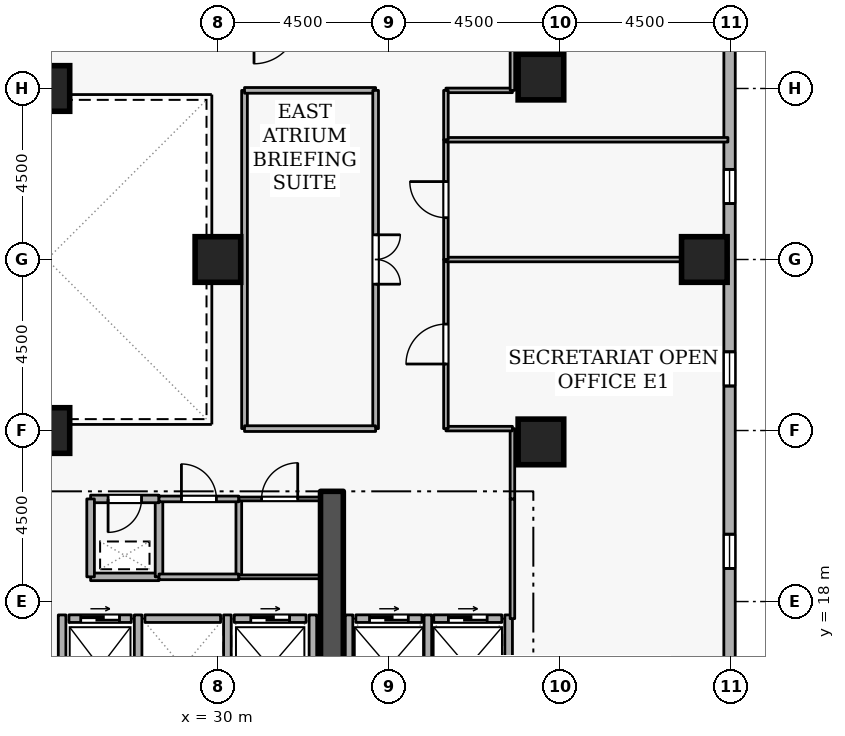
"""IFC4 building model, lengths in metres.
Left out: names, types, materials, properties, quantities, classifications, styles, units other than length and angle.
Written with IfcOpenShell. Run it as: python <this file> out.ifc"""

import sys

from ifc_helpers import new_model, si_unit, direction, frame, frame_2d, origin, origin_2d, place, context, subcontext, project, spatial, rectangle, extrude, element, fill, save


model = new_model("IFC4")
c1 = context("Model", 3, precision=1e-05, world=origin(), true_north=direction((0.0, 1.0)))
c2 = subcontext(c1, "Body", "Model", "MODEL_VIEW")
j1 = project(units=[si_unit("LENGTHUNIT", "METRE"), si_unit("PLANEANGLEUNIT", "RADIAN")], contexts=[c1])
p1 = place(None, origin())
s1 = spatial("IfcSite", under=j1, at=p1, CompositionType="ELEMENT")
p2 = place(p1, origin())
s2 = spatial("IfcBuilding", under=s1, at=p2, CompositionType="ELEMENT")
p3 = place(p2, frame((0.0, 0.0, 108.9)))
s3 = spatial("IfcBuildingStorey", under=s2, at=p3, CompositionType="ELEMENT", Elevation=108.9)
p4 = place(p3, frame((33.0, 15.2, 0.0), z_axis=(0.0, 0.0, 1.0), x_axis=(0.0, 1.0, 0.0)))
e1 = element("IfcWall", 1, at=p4, inside=s3, PredefinedType="SHEAR", context=c2, shape_type="SweptSolid", body=[
    extrude(rectangle(XDim=5.7, YDim=0.6, at=frame_2d((2.85, 0.0))), origin(), (0.0, 0.0, 1.0), 3.6),
])
for number, where, z_axis, x_axis in (
    (2, (42.8, 27.0, 0.0), (0.0, 0.0, 1.0), (1.0, 0.0, 0.0)),
    (3, (38.5, 22.2, 0.0), (0.0, 0.0, 1.0), (1.0, 0.0, 0.0)),
    (4, (38.5, 31.8, 0.0), (0.0, 0.0, 1.0), (1.0, 0.0, 0.0)),
    (5, (25.5, 22.5, 0.0), (0.0, 0.0, 1.0), (1.0, 0.0, 0.0)),
    (6, (25.5, 31.5, 0.0), (0.0, 0.0, 1.0), (1.0, 0.0, 0.0)),
    (7, (30.0, 27.0, 0.0), (0.0, 0.0, 1.0), (1.0, 0.0, 0.0)),
):
    element("IfcColumn", number, at=place(p3, frame(where, z_axis=z_axis, x_axis=x_axis)), inside=s3, PredefinedType="COLUMN", context=c2, shape_type="SweptSolid", body=[
        extrude(rectangle(XDim=1.2, YDim=1.2, at=origin_2d()), origin(), (0.0, 0.0, 1.0), 3.6),
    ])
p5 = place(p3, frame((43.463, 12.271, 0.0), z_axis=(0.0, 0.0, 1.0), x_axis=(5.4088042e-05, 0.999999998537, 0.0)))
e8 = element("IfcWall", 8, at=p5, inside=s3, PredefinedType="STANDARD", context=c2, shape_type="SweptSolid", body=[
    extrude(rectangle(XDim=36.11, YDim=0.3, at=frame_2d((18.055, 0.0))), origin(), (0.0, 0.0, 1.0), 2.7),
])
p6 = place(p5, frame((6.6, 0.0, 0.72)))
e9 = element("IfcOpeningElement", 9, at=p6, cuts=e8, PredefinedType="OPENING", context=c2, shape_type="SweptSolid", body=[
    extrude(rectangle(XDim=0.9, YDim=1.75, at=frame_2d((0.45, 0.875))), frame((0.0, 0.16, 0.0), z_axis=(0.0, -1.0, 0.0), x_axis=(1.0, 0.0, 0.0)), (0.0, 0.0, 1.0), 0.32),
])
p7 = place(p5, frame((11.4, 0.0, 0.72)))
e10 = element("IfcOpeningElement", 10, at=p7, cuts=e8, PredefinedType="OPENING", context=c2, shape_type="SweptSolid", body=[
    extrude(rectangle(XDim=0.9, YDim=1.75, at=frame_2d((0.45, 0.875))), frame((0.0, 0.16, 0.0), z_axis=(0.0, -1.0, 0.0), x_axis=(1.0, 0.0, 0.0)), (0.0, 0.0, 1.0), 0.32),
])
p8 = place(p5, frame((16.2, 0.0, 0.72)))
e11 = element("IfcOpeningElement", 11, at=p8, cuts=e8, PredefinedType="OPENING", context=c2, shape_type="SweptSolid", body=[
    extrude(rectangle(XDim=0.9, YDim=1.75, at=frame_2d((0.45, 0.875))), frame((0.0, 0.16, 0.0), z_axis=(0.0, -1.0, 0.0), x_axis=(1.0, 0.0, 0.0)), (0.0, 0.0, 1.0), 0.32),
])
p9 = place(p5, frame((21.0, 0.0, 0.72)))
e12 = element("IfcOpeningElement", 12, at=p9, cuts=e8, PredefinedType="OPENING", context=c2, shape_type="SweptSolid", body=[
    extrude(rectangle(XDim=0.9, YDim=1.75, at=frame_2d((0.45, 0.875))), frame((0.0, 0.16, 0.0), z_axis=(0.0, -1.0, 0.0), x_axis=(1.0, 0.0, 0.0)), (0.0, 0.0, 1.0), 0.32),
])
p10 = place(p5, frame((30.6, 0.0, 0.72)))
e13 = element("IfcOpeningElement", 13, at=p10, cuts=e8, PredefinedType="OPENING", context=c2, shape_type="SweptSolid", body=[
    extrude(rectangle(XDim=0.9, YDim=1.75, at=frame_2d((0.45, 0.875))), frame((0.0, 0.16, 0.0), z_axis=(0.0, -1.0, 0.0), x_axis=(1.0, 0.0, 0.0)), (0.0, 0.0, 1.0), 0.32),
])
p11 = place(p3, frame((26.08, 17.55, 0.0), z_axis=(0.0, 0.0, 1.0), x_axis=(1.0, 0.0, 0.0)))
e14 = element("IfcWall", 14, at=p11, inside=s3, PredefinedType="STANDARD", context=c2, shape_type="SweptSolid", body=[
    extrude(rectangle(XDim=1.64, YDim=0.2, at=frame_2d((0.82, 0.0))), origin(), (0.0, 0.0, 1.0), 3.34),
])
p12 = place(p11, frame((0.31, 0.0, 0.0)))
e15 = element("IfcOpeningElement", 15, at=p12, cuts=e14, PredefinedType="OPENING", context=c2, shape_type="SweptSolid", body=[
    extrude(rectangle(XDim=1.02, YDim=2.06, at=frame_2d((0.51, 1.03))), frame((0.0, 0.11, 0.0), z_axis=(0.0, -1.0, 0.0), x_axis=(1.0, 0.0, 0.0)), (0.0, 0.0, 1.0), 0.22),
])
p13 = place(p3, frame((28.08, 17.55, 0.0), z_axis=(0.0, 0.0, 1.0), x_axis=(1.0, 0.0, 0.0)))
e16 = element("IfcWall", 16, at=p13, inside=s3, PredefinedType="STANDARD", context=c2, shape_type="SweptSolid", body=[
    extrude(rectangle(XDim=1.99, YDim=0.2, at=frame_2d((0.995, 0.0))), origin(), (0.0, 0.0, 1.0), 3.34),
])
p14 = place(p3, frame((30.43, 17.55, 0.0), z_axis=(0.0, 0.0, 1.0), x_axis=(1.0, 0.0, 0.0)))
e17 = element("IfcWall", 17, at=p14, inside=s3, PredefinedType="STANDARD", context=c2, shape_type="SweptSolid", body=[
    extrude(rectangle(XDim=1.89, YDim=0.2, at=frame_2d((0.945, 0.0))), origin(), (0.0, 0.0, 1.0), 3.34),
])
p15 = place(p14, frame((0.435, 0.0, 0.0)))
e18 = element("IfcOpeningElement", 18, at=p15, cuts=e17, PredefinedType="OPENING", context=c2, shape_type="SweptSolid", body=[
    extrude(rectangle(XDim=1.02, YDim=2.06, at=frame_2d((0.51, 1.03))), frame((0.0, 0.11, 0.0), z_axis=(0.0, -1.0, 0.0), x_axis=(1.0, 0.0, 0.0)), (0.0, 0.0, 1.0), 0.22),
])
p16 = place(p3, frame((33.63, 17.55, 0.0), z_axis=(0.0, 0.0, 1.0), x_axis=(1.0, 0.0, 0.0)))
e19 = element("IfcWall", 19, at=p16, inside=s3, PredefinedType="STANDARD", context=c2, shape_type="SweptSolid", body=[
    extrude(rectangle(XDim=1.74, YDim=0.2, at=frame_2d((0.87, 0.0))), origin(), (0.0, 0.0, 1.0), 3.34),
])
p17 = place(p16, frame((0.36, 0.0, 0.0)))
e20 = element("IfcOpeningElement", 20, at=p17, cuts=e19, PredefinedType="OPENING", context=c2, shape_type="SweptSolid", body=[
    extrude(rectangle(XDim=1.02, YDim=2.06, at=frame_2d((0.51, 1.03))), frame((0.0, 0.11, 0.0), z_axis=(0.0, -1.0, 0.0), x_axis=(1.0, 0.0, 0.0)), (0.0, 0.0, 1.0), 0.22),
])
p18 = place(p3, frame((35.68, 17.55, 0.0), z_axis=(0.0, 0.0, 1.0), x_axis=(1.0, 0.0, 0.0)))
e21 = element("IfcWall", 21, at=p18, inside=s3, PredefinedType="STANDARD", context=c2, shape_type="SweptSolid", body=[
    extrude(rectangle(XDim=1.79, YDim=0.2, at=frame_2d((0.895, 0.0))), origin(), (0.0, 0.0, 1.0), 3.34),
])
p19 = place(p18, frame((0.385, 0.0, 0.0)))
e22 = element("IfcOpeningElement", 22, at=p19, cuts=e21, PredefinedType="OPENING", context=c2, shape_type="SweptSolid", body=[
    extrude(rectangle(XDim=1.02, YDim=2.06, at=frame_2d((0.51, 1.03))), frame((0.0, 0.11, 0.0), z_axis=(0.0, -1.0, 0.0), x_axis=(1.0, 0.0, 0.0)), (0.0, 0.0, 1.0), 0.22),
])
for number, where, z_axis, x_axis in (
    (23, (27.9, 15.212, 0.0), (0.0, 0.0, 1.0), (0.0, 1.0, 0.0)),
    (24, (25.9, 15.212, 0.0), (0.0, 0.0, 1.0), (0.0, 1.0, 0.0)),
    (25, (30.25, 15.212, 0.0), (0.0, 0.0, 1.0), (0.0, 1.0, 0.0)),
    (26, (32.5, 15.212, 0.0), (0.0, 0.0, 1.0), (0.0, 1.0, 0.0)),
):
    element("IfcWall", number, at=place(p3, frame(where, z_axis=z_axis, x_axis=x_axis)), inside=s3, PredefinedType="STANDARD", context=c2, shape_type="SweptSolid", body=[
        extrude(rectangle(XDim=2.436, YDim=0.2, at=frame_2d((1.218, 0.0))), origin(), (0.0, 0.0, 1.0), 3.34),
    ])
for number, where, z_axis, x_axis in (
    (27, (35.525, 15.012, 0.0), (0.0, 0.0, 1.0), (0.0, 1.0, 0.0)),
    (28, (33.45, 15.012, 0.0), (0.0, 0.0, 1.0), (0.0, 1.0, 0.0)),
    (29, (37.65, 15.012, 0.0), (0.0, 0.0, 1.0), (0.0, 1.0, 0.0)),
):
    element("IfcWall", number, at=place(p3, frame(where, z_axis=z_axis, x_axis=x_axis)), inside=s3, PredefinedType="STANDARD", context=c2, shape_type="SweptSolid", body=[
        extrude(rectangle(XDim=2.636, YDim=0.2, at=frame_2d((1.318, 0.0))), origin(), (0.0, 0.0, 1.0), 3.34),
    ])
p20 = place(p3, frame((26.65, 18.65, 0.0), z_axis=(0.0, 0.0, 1.0), x_axis=(1.0, 0.0, 0.0)))
e30 = element("IfcWall", 30, at=p20, inside=s3, PredefinedType="STANDARD", context=c2, shape_type="SweptSolid", body=[
    extrude(rectangle(XDim=1.8, YDim=0.2, at=frame_2d((0.9, 0.0))), origin(), (0.0, 0.0, 1.0), 3.34),
])
p21 = place(p3, frame((28.45, 18.65, 0.0), z_axis=(0.0, 0.0, 1.0), x_axis=(0.0, 1.0, 0.0)))
e31 = element("IfcWall", 31, at=p21, inside=s3, PredefinedType="STANDARD", context=c2, shape_type="SweptSolid", body=[
    extrude(rectangle(XDim=2.05, YDim=0.2, at=frame_2d((1.025, 0.0))), origin(), (0.0, 0.0, 1.0), 3.34),
])
p22 = place(p3, frame((28.45, 20.7, 0.0), z_axis=(0.0, 0.0, 1.0), x_axis=(-1.0, 0.0, 0.0)))
e32 = element("IfcWall", 32, at=p22, inside=s3, PredefinedType="STANDARD", context=c2, shape_type="SweptSolid", body=[
    extrude(rectangle(XDim=1.8, YDim=0.2, at=frame_2d((0.9, 0.0))), origin(), (0.0, 0.0, 1.0), 3.34),
])
p23 = place(p22, frame((0.46, 0.0, 0.0)))
e33 = element("IfcOpeningElement", 33, at=p23, cuts=e32, PredefinedType="OPENING", context=c2, shape_type="SweptSolid", body=[
    extrude(rectangle(XDim=0.88, YDim=2.04, at=frame_2d((0.44, 1.02))), frame((0.0, 0.11, 0.0), z_axis=(0.0, -1.0, 0.0), x_axis=(1.0, 0.0, 0.0)), (0.0, 0.0, 1.0), 0.22),
])
p24 = place(p3, frame((26.65, 20.7, 0.0), z_axis=(0.0, 0.0, 1.0), x_axis=(0.0, -1.0, 0.0)))
e34 = element("IfcWall", 34, at=p24, inside=s3, PredefinedType="STANDARD", context=c2, shape_type="SweptSolid", body=[
    extrude(rectangle(XDim=2.05, YDim=0.2, at=frame_2d((1.025, 0.0))), origin(), (0.0, 0.0, 1.0), 3.34),
])
p25 = place(p3, frame((30.55, 20.7, 0.0), z_axis=(0.0, 0.0, 1.0), x_axis=(0.0, -1.0, 0.0)))
e35 = element("IfcWall", 35, at=p25, inside=s3, PredefinedType="PARTITIONING", context=c2, shape_type="SweptSolid", body=[
    extrude(rectangle(XDim=2.05, YDim=0.15, at=frame_2d((1.025, 0.0))), origin(), (0.0, 0.0, 1.0), 3.34),
])
p26 = place(p3, frame((30.55, 18.65, 0.0), z_axis=(0.0, 0.0, 1.0), x_axis=(-1.0, 0.0, 0.0)))
e36 = element("IfcWall", 36, at=p26, inside=s3, PredefinedType="PARTITIONING", context=c2, shape_type="SweptSolid", body=[
    extrude(rectangle(XDim=2.1, YDim=0.15, at=frame_2d((1.05, 0.0))), origin(), (0.0, 0.0, 1.0), 3.34),
])
p27 = place(p3, frame((28.45, 20.7, 0.0), z_axis=(0.0, 0.0, 1.0), x_axis=(1.0, 0.0, 0.0)))
e37 = element("IfcWall", 37, at=p27, inside=s3, PredefinedType="PARTITIONING", context=c2, shape_type="SweptSolid", body=[
    extrude(rectangle(XDim=2.1, YDim=0.15, at=frame_2d((1.05, 0.0))), origin(), (0.0, 0.0, 1.0), 3.34),
])
p28 = place(p27, frame((0.59, 0.0, 0.0)))
e38 = element("IfcOpeningElement", 38, at=p28, cuts=e37, PredefinedType="OPENING", context=c2, shape_type="SweptSolid", body=[
    extrude(rectangle(XDim=0.92, YDim=2.08, at=frame_2d((0.46, 1.04))), frame((0.0, 0.085, 0.0), z_axis=(0.0, -1.0, 0.0), x_axis=(1.0, 0.0, 0.0)), (0.0, 0.0, 1.0), 0.17),
])
p29 = place(p3, frame((32.7, 18.65, 0.0), z_axis=(0.0, 0.0, 1.0), x_axis=(-1.0, 0.0, 0.0)))
e39 = element("IfcWall", 39, at=p29, inside=s3, PredefinedType="PARTITIONING", context=c2, shape_type="SweptSolid", body=[
    extrude(rectangle(XDim=2.15, YDim=0.1, at=frame_2d((1.075, 0.0))), origin(), (0.0, 0.0, 1.0), 3.34),
])
p30 = place(p3, frame((30.55, 20.7, 0.0), z_axis=(0.0, 0.0, 1.0), x_axis=(1.0, 0.0, 0.0)))
e40 = element("IfcWall", 40, at=p30, inside=s3, PredefinedType="PARTITIONING", context=c2, shape_type="SweptSolid", body=[
    extrude(rectangle(XDim=2.15, YDim=0.1, at=frame_2d((1.075, 0.0))), origin(), (0.0, 0.0, 1.0), 3.34),
])
p31 = place(p30, frame((0.6, 0.0, 0.0)))
e41 = element("IfcOpeningElement", 41, at=p31, cuts=e40, PredefinedType="OPENING", context=c2, shape_type="SweptSolid", body=[
    extrude(rectangle(XDim=0.95, YDim=2.1, at=frame_2d((0.475, 1.05))), frame((0.0, 0.06, 0.0), z_axis=(0.0, -1.0, 0.0), x_axis=(1.0, 0.0, 0.0)), (0.0, 0.0, 1.0), 0.12),
])
p32 = place(p3, frame((37.75, 17.55, 0.0), z_axis=(0.0, 0.0, 1.0), x_axis=(0.0, 1.0, 0.0)))
e42 = element("IfcWall", 42, at=p32, inside=s3, PredefinedType="PARTITIONING", context=c2, shape_type="SweptSolid", body=[
    extrude(rectangle(XDim=3.15, YDim=0.12, at=frame_2d((1.575, 0.0))), origin(), (0.0, 0.0, 1.0), 3.34),
])
p33 = place(p3, frame((37.75, 20.7, 0.0), z_axis=(0.0, 0.0, 1.0), x_axis=(0.0, 1.0, 0.0)))
e43 = element("IfcWall", 43, at=p33, inside=s3, PredefinedType="PARTITIONING", context=c2, shape_type="SweptSolid", body=[
    extrude(rectangle(XDim=1.85, YDim=0.12, at=frame_2d((0.925, 0.0))), origin(), (0.0, 0.0, 1.0), 3.34),
])
p34 = place(p3, frame((37.75, 22.55, 0.0), z_axis=(0.0, 0.0, 1.0), x_axis=(-1.0, 0.0, 0.0)))
e44 = element("IfcWall", 44, at=p34, inside=s3, PredefinedType="PARTITIONING", context=c2, shape_type="SweptSolid", body=[
    extrude(rectangle(XDim=1.75, YDim=0.12, at=frame_2d((0.875, 0.0))), origin(), (0.0, 0.0, 1.0), 3.34),
])
p35 = place(p3, frame((36.0, 22.55, 0.0), z_axis=(0.0, 0.0, 1.0), x_axis=(0.0, 1.0, 0.0)))
e45 = element("IfcWall", 45, at=p35, inside=s3, PredefinedType="PARTITIONING", context=c2, shape_type="SweptSolid", body=[
    extrude(rectangle(XDim=4.45, YDim=0.12, at=frame_2d((2.225, 0.0))), origin(), (0.0, 0.0, 1.0), 3.34),
])
p36 = place(p35, frame((1.7, 0.0, 0.0)))
e46 = element("IfcOpeningElement", 46, at=p36, cuts=e45, PredefinedType="OPENING", context=c2, shape_type="SweptSolid", body=[
    extrude(rectangle(XDim=1.05, YDim=2.1, at=frame_2d((0.525, 1.05))), frame((0.0, 0.07, 0.0), z_axis=(0.0, -1.0, 0.0), x_axis=(1.0, 0.0, 0.0)), (0.0, 0.0, 1.0), 0.14),
])
p37 = place(p3, frame((36.0, 27.0, 0.0), z_axis=(0.0, 0.0, 1.0), x_axis=(1.0, 0.0, 0.0)))
e47 = element("IfcWall", 47, at=p37, inside=s3, PredefinedType="PARTITIONING", context=c2, shape_type="SweptSolid", body=[
    extrude(rectangle(XDim=7.42, YDim=0.12, at=frame_2d((3.71, 0.0))), origin(), (0.0, 0.0, 1.0), 2.882),
])
p38 = place(p3, frame((36.0, 27.0, 0.0), z_axis=(0.0, 0.0, 1.0), x_axis=(0.0, 1.0, 0.0)))
e48 = element("IfcWall", 48, at=p38, inside=s3, PredefinedType="PARTITIONING", context=c2, shape_type="SweptSolid", body=[
    extrude(rectangle(XDim=3.15, YDim=0.12, at=frame_2d((1.575, 0.0))), origin(), (0.0, 0.0, 1.0), 3.34),
])
p39 = place(p38, frame((1.1, 0.0, 0.0)))
e49 = element("IfcOpeningElement", 49, at=p39, cuts=e48, PredefinedType="OPENING", context=c2, shape_type="SweptSolid", body=[
    extrude(rectangle(XDim=0.95, YDim=2.1, at=frame_2d((0.475, 1.05))), frame((0.0, 0.07, 0.0), z_axis=(0.0, -1.0, 0.0), x_axis=(1.0, 0.0, 0.0)), (0.0, 0.0, 1.0), 0.14),
])
p40 = place(p3, frame((36.0, 30.15, 0.0), z_axis=(0.0, 0.0, 1.0), x_axis=(1.0, 0.0, 0.0)))
e50 = element("IfcWall", 50, at=p40, inside=s3, PredefinedType="PARTITIONING", context=c2, shape_type="SweptSolid", body=[
    extrude(rectangle(XDim=7.42, YDim=0.12, at=frame_2d((3.71, 0.0))), origin(), (0.0, 0.0, 1.0), 3.34),
])
p41 = place(p3, frame((36.0, 31.45, 0.0), z_axis=(0.0, 0.0, 1.0), x_axis=(1.0, 0.0, 0.0)))
e51 = element("IfcWall", 51, at=p41, inside=s3, PredefinedType="PARTITIONING", context=c2, shape_type="SweptSolid", body=[
    extrude(rectangle(XDim=1.75, YDim=0.12, at=frame_2d((0.875, 0.0))), origin(), (0.0, 0.0, 1.0), 3.34),
])
p42 = place(p3, frame((37.75, 31.45, 0.0), z_axis=(0.0, 0.0, 1.0), x_axis=(0.0, 1.0, 0.0)))
e52 = element("IfcWall", 52, at=p42, inside=s3, PredefinedType="PARTITIONING", context=c2, shape_type="SweptSolid", body=[
    extrude(rectangle(XDim=1.85, YDim=0.12, at=frame_2d((0.925, 0.0))), origin(), (0.0, 0.0, 1.0), 3.34),
])
p43 = place(p3, frame((36.0, 30.15, 0.0), z_axis=(0.0, 0.0, 1.0), x_axis=(0.0, 1.0, 0.0)))
e53 = element("IfcWall", 53, at=p43, inside=s3, PredefinedType="PARTITIONING", context=c2, shape_type="SweptSolid", body=[
    extrude(rectangle(XDim=1.3, YDim=0.12, at=frame_2d((0.65, 0.0))), origin(), (0.0, 0.0, 1.0), 3.34),
])
p44 = place(p3, frame((30.7, 22.55, 0.0), z_axis=(0.0, 0.0, 1.0), x_axis=(0.0, 1.0, 0.0)))
e54 = element("IfcWall", 54, at=p44, inside=s3, PredefinedType="PARTITIONING", context=c2, shape_type="SweptSolid", body=[
    extrude(rectangle(XDim=8.9, YDim=0.15, at=frame_2d((4.45, 0.0))), origin(), (0.0, 0.0, 1.0), 3.34),
])
p45 = place(p3, frame((30.7, 31.45, 0.0), z_axis=(0.0, 0.0, 1.0), x_axis=(1.0, 0.0, 0.0)))
e55 = element("IfcWall", 55, at=p45, inside=s3, PredefinedType="PARTITIONING", context=c2, shape_type="SweptSolid", body=[
    extrude(rectangle(XDim=3.45, YDim=0.15, at=frame_2d((1.725, 0.0))), origin(), (0.0, 0.0, 1.0), 3.34),
])
p46 = place(p3, frame((34.15, 31.45, 0.0), z_axis=(0.0, 0.0, 1.0), x_axis=(0.0, -1.0, 0.0)))
e56 = element("IfcWall", 56, at=p46, inside=s3, PredefinedType="PARTITIONING", context=c2, shape_type="SweptSolid", body=[
    extrude(rectangle(XDim=8.9, YDim=0.15, at=frame_2d((4.45, 0.0))), origin(), (0.0, 0.0, 1.0), 3.34),
])
p47 = place(p46, frame((3.8, 0.0, 0.0)))
e57 = element("IfcOpeningElement", 57, at=p47, cuts=e56, PredefinedType="OPENING", context=c2, shape_type="SweptSolid", body=[
    extrude(rectangle(XDim=1.3, YDim=2.12, at=frame_2d((0.65, 1.06))), frame((0.0, 0.085, 0.0), z_axis=(0.0, -1.0, 0.0), x_axis=(1.0, 0.0, 0.0)), (0.0, 0.0, 1.0), 0.17),
])
p48 = place(p3, frame((34.15, 22.55, 0.0), z_axis=(0.0, 0.0, 1.0), x_axis=(-1.0, 0.0, 0.0)))
e58 = element("IfcWall", 58, at=p48, inside=s3, PredefinedType="PARTITIONING", context=c2, shape_type="SweptSolid", body=[
    extrude(rectangle(XDim=3.45, YDim=0.15, at=frame_2d((1.725, 0.0))), origin(), (0.0, 0.0, 1.0), 3.34),
])
p49 = place(p6, origin())
e59 = element("IfcWindow", 59, at=p49, inside=s3, PartitioningType="SINGLE_PANEL", PredefinedType="WINDOW", context=c2, shape_type="SweptSolid", body=[
    extrude(rectangle(XDim=0.9, YDim=1.75, at=frame_2d((0.45, 0.875))), frame((0.0, 0.03, 0.0), z_axis=(0.0, -1.0, 0.0), x_axis=(1.0, 0.0, 0.0)), (0.0, 0.0, 1.0), 0.06),
])
fill(e9, e59)
p50 = place(p7, origin())
e60 = element("IfcWindow", 60, at=p50, inside=s3, PartitioningType="SINGLE_PANEL", PredefinedType="WINDOW", context=c2, shape_type="SweptSolid", body=[
    extrude(rectangle(XDim=0.9, YDim=1.75, at=frame_2d((0.45, 0.875))), frame((0.0, 0.03, 0.0), z_axis=(0.0, -1.0, 0.0), x_axis=(1.0, 0.0, 0.0)), (0.0, 0.0, 1.0), 0.06),
])
fill(e10, e60)
p51 = place(p8, origin())
e61 = element("IfcWindow", 61, at=p51, inside=s3, PartitioningType="SINGLE_PANEL", PredefinedType="WINDOW", context=c2, shape_type="SweptSolid", body=[
    extrude(rectangle(XDim=0.9, YDim=1.75, at=frame_2d((0.45, 0.875))), frame((0.0, 0.03, 0.0), z_axis=(0.0, -1.0, 0.0), x_axis=(1.0, 0.0, 0.0)), (0.0, 0.0, 1.0), 0.06),
])
fill(e11, e61)
p52 = place(p12, origin())
e62 = element("IfcDoor", 62, at=p52, inside=s3, OperationType="SLIDING_TO_LEFT", PredefinedType="DOOR", context=c2, shape_type="SweptSolid", body=[
    extrude(rectangle(XDim=1.02, YDim=2.06, at=frame_2d((0.51, 1.03))), frame((0.0, 0.025, 0.0), z_axis=(0.0, -1.0, 0.0), x_axis=(1.0, 0.0, 0.0)), (0.0, 0.0, 1.0), 0.05),
])
fill(e15, e62)
p53 = place(p15, origin())
e63 = element("IfcDoor", 63, at=p53, inside=s3, OperationType="SLIDING_TO_LEFT", PredefinedType="DOOR", context=c2, shape_type="SweptSolid", body=[
    extrude(rectangle(XDim=1.02, YDim=2.06, at=frame_2d((0.51, 1.03))), frame((0.0, 0.025, 0.0), z_axis=(0.0, -1.0, 0.0), x_axis=(1.0, 0.0, 0.0)), (0.0, 0.0, 1.0), 0.05),
])
fill(e18, e63)
p54 = place(p17, origin())
e64 = element("IfcDoor", 64, at=p54, inside=s3, OperationType="SLIDING_TO_LEFT", PredefinedType="DOOR", context=c2, shape_type="SweptSolid", body=[
    extrude(rectangle(XDim=1.02, YDim=2.06, at=frame_2d((0.51, 1.03))), frame((0.0, 0.025, 0.0), z_axis=(0.0, -1.0, 0.0), x_axis=(1.0, 0.0, 0.0)), (0.0, 0.0, 1.0), 0.05),
])
fill(e20, e64)
p55 = place(p19, origin())
e65 = element("IfcDoor", 65, at=p55, inside=s3, OperationType="SLIDING_TO_LEFT", PredefinedType="DOOR", context=c2, shape_type="SweptSolid", body=[
    extrude(rectangle(XDim=1.02, YDim=2.06, at=frame_2d((0.51, 1.03))), frame((0.0, 0.025, 0.0), z_axis=(0.0, -1.0, 0.0), x_axis=(1.0, 0.0, 0.0)), (0.0, 0.0, 1.0), 0.05),
])
fill(e22, e65)
p56 = place(p23, origin())
e66 = element("IfcDoor", 66, at=p56, inside=s3, OperationType="SINGLE_SWING_RIGHT", PredefinedType="DOOR", context=c2, shape_type="SweptSolid", body=[
    extrude(rectangle(XDim=0.88, YDim=2.04, at=frame_2d((0.44, 1.02))), frame((0.0, 0.025, 0.0), z_axis=(0.0, -1.0, 0.0), x_axis=(1.0, 0.0, 0.0)), (0.0, 0.0, 1.0), 0.05),
])
fill(e33, e66)
p57 = place(p28, origin())
e67 = element("IfcDoor", 67, at=p57, inside=s3, OperationType="SINGLE_SWING_LEFT", PredefinedType="DOOR", context=c2, shape_type="SweptSolid", body=[
    extrude(rectangle(XDim=0.92, YDim=2.08, at=frame_2d((0.46, 1.04))), frame((0.0, 0.025, 0.0), z_axis=(0.0, -1.0, 0.0), x_axis=(1.0, 0.0, 0.0)), (0.0, 0.0, 1.0), 0.05),
])
fill(e38, e67)
p58 = place(p31, origin())
e68 = element("IfcDoor", 68, at=p58, inside=s3, OperationType="SINGLE_SWING_RIGHT", PredefinedType="DOOR", context=c2, shape_type="SweptSolid", body=[
    extrude(rectangle(XDim=0.95, YDim=2.1, at=frame_2d((0.475, 1.05))), frame((0.0, 0.025, 0.0), z_axis=(0.0, -1.0, 0.0), x_axis=(1.0, 0.0, 0.0)), (0.0, 0.0, 1.0), 0.05),
])
fill(e41, e68)
p59 = place(p36, origin())
e69 = element("IfcDoor", 69, at=p59, inside=s3, OperationType="SINGLE_SWING_LEFT", PredefinedType="DOOR", context=c2, shape_type="SweptSolid", body=[
    extrude(rectangle(XDim=1.05, YDim=2.1, at=frame_2d((0.525, 1.05))), frame((0.0, 0.025, 0.0), z_axis=(0.0, -1.0, 0.0), x_axis=(1.0, 0.0, 0.0)), (0.0, 0.0, 1.0), 0.05),
])
fill(e46, e69)
p60 = place(p39, origin())
e70 = element("IfcDoor", 70, at=p60, inside=s3, OperationType="SINGLE_SWING_RIGHT", PredefinedType="DOOR", context=c2, shape_type="SweptSolid", body=[
    extrude(rectangle(XDim=0.95, YDim=2.1, at=frame_2d((0.475, 1.05))), frame((0.0, 0.025, 0.0), z_axis=(0.0, -1.0, 0.0), x_axis=(1.0, 0.0, 0.0)), (0.0, 0.0, 1.0), 0.05),
])
fill(e49, e70)
p61 = place(p47, origin())
e71 = element("IfcDoor", 71, at=p61, inside=s3, OperationType="DOUBLE_DOOR_SINGLE_SWING", PredefinedType="DOOR", context=c2, shape_type="SweptSolid", body=[
    extrude(rectangle(XDim=1.3, YDim=2.12, at=frame_2d((0.65, 1.06))), frame((0.0, 0.025, 0.0), z_axis=(0.0, -1.0, 0.0), x_axis=(1.0, 0.0, 0.0)), (0.0, 0.0, 1.0), 0.05),
])
fill(e57, e71)
save(model, sys.argv[1])
